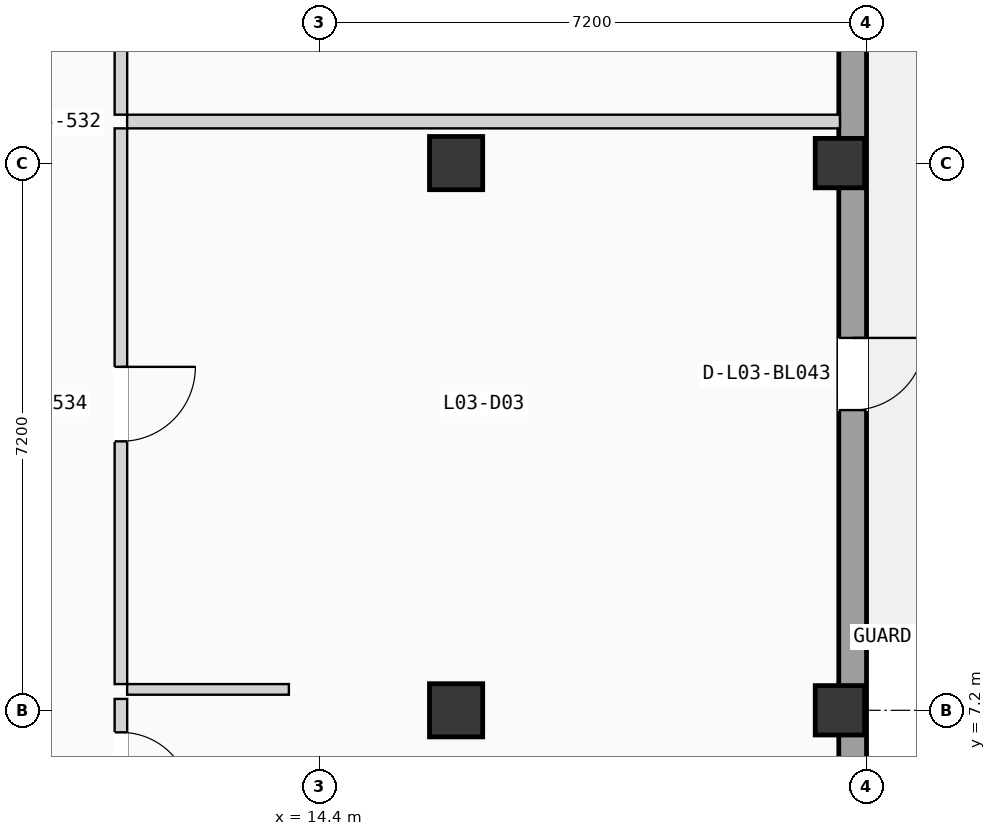
"""IFC4 building model, lengths in metres.
Left out: names, types, materials, properties, quantities, classifications, styles, units other than length and angle.
Written with IfcOpenShell. Run it as: python <this file> out.ifc"""

import sys

from ifc_helpers import new_model, si_unit, direction, frame, frame_2d, origin, origin_2d, place, context, subcontext, project, spatial, rectangle, extrude, element, fill, save


model = new_model("IFC4")
c1 = context("Model", 3, precision=1e-05, world=origin(), true_north=direction((0.0, 1.0)))
c2 = subcontext(c1, "Body", "Model", "MODEL_VIEW")
j1 = project(units=[si_unit("LENGTHUNIT", "METRE"), si_unit("PLANEANGLEUNIT", "RADIAN")], contexts=[c1])
p1 = place(None, origin())
s1 = spatial("IfcSite", under=j1, at=p1, CompositionType="ELEMENT")
p2 = place(p1, origin())
s2 = spatial("IfcBuilding", under=s1, at=p2, CompositionType="ELEMENT")
p3 = place(p2, frame((0.0, 0.0, 12.075)))
s3 = spatial("IfcBuildingStorey", under=s2, at=p3, CompositionType="ELEMENT", Elevation=12.075)
for number, where, z_axis, x_axis in (
    (1, (16.2, 7.2, 0.0), (0.0, 0.0, 1.0), (1.0, 0.0, 0.0)),
    (2, (16.2, 14.4, 0.0), (0.0, 0.0, 1.0), (1.0, 0.0, 0.0)),
):
    element("IfcColumn", number, at=place(p3, frame(where, z_axis=z_axis, x_axis=x_axis)), inside=s3, PredefinedType="COLUMN", context=c2, shape_type="SweptSolid", body=[
        extrude(rectangle(XDim=0.7, YDim=0.7, at=origin_2d()), origin(), (0.0, 0.0, 1.0), 3.15),
    ])
for number, where, z_axis, x_axis in (
    (3, (21.25, 7.2, 0.0), (0.0, 0.0, 1.0), (1.0, 0.0, 0.0)),
    (4, (21.25, 14.4, 0.0), (0.0, 0.0, 1.0), (1.0, 0.0, 0.0)),
):
    element("IfcColumn", number, at=place(p3, frame(where, z_axis=z_axis, x_axis=x_axis)), inside=s3, PredefinedType="COLUMN", context=c2, shape_type="SweptSolid", body=[
        extrude(rectangle(XDim=0.65, YDim=0.65, at=origin_2d()), origin(), (0.0, 0.0, 1.0), 3.15),
    ])
p4 = place(p3, frame((21.417, 0.365, 0.0), z_axis=(0.0, 0.0, 1.0), x_axis=(0.0, 1.0, 0.0)))
e5 = element("IfcWall", 5, at=p4, inside=s3, PredefinedType="SOLIDWALL", context=c2, shape_type="SweptSolid", body=[
    extrude(rectangle(XDim=49.67, YDim=0.365, at=frame_2d((24.835, 0.0))), origin(), (0.0, 0.0, 1.0), 2.89),
])
p5 = place(p4, frame((10.785, 0.0, 0.0)))
e6 = element("IfcOpeningElement", 6, at=p5, cuts=e5, PredefinedType="OPENING", context=c2, shape_type="SweptSolid", body=[
    extrude(rectangle(XDim=0.95, YDim=2.15, at=frame_2d((0.475, 1.075))), frame((0.0, 0.192, 0.0), z_axis=(0.0, -1.0, 0.0), x_axis=(1.0, 0.0, 0.0)), (0.0, 0.0, 1.0), 0.385),
])
p6 = place(p4, frame((16.893, 0.0, 0.855)))
e7 = element("IfcOpeningElement", 7, at=p6, cuts=e5, PredefinedType="OPENING", context=c2, shape_type="SweptSolid", body=[
    extrude(rectangle(XDim=1.85, YDim=1.35, at=frame_2d((0.925, 0.675))), frame((0.0, 0.192, 0.0), z_axis=(0.0, -1.0, 0.0), x_axis=(1.0, 0.0, 0.0)), (0.0, 0.0, 1.0), 0.385),
])
p7 = place(p4, frame((32.32, 0.0, 0.0)))
e8 = element("IfcOpeningElement", 8, at=p7, cuts=e5, PredefinedType="OPENING", context=c2, shape_type="SweptSolid", body=[
    extrude(rectangle(XDim=1.08, YDim=2.18, at=frame_2d((0.54, 1.09))), frame((0.0, 0.192, 0.0), z_axis=(0.0, -1.0, 0.0), x_axis=(1.0, 0.0, 0.0)), (0.0, 0.0, 1.0), 0.385),
])
p8 = place(p4, frame((24.212, 0.0, 0.705)))
e9 = element("IfcOpeningElement", 9, at=p8, cuts=e5, PredefinedType="OPENING", context=c2, shape_type="SweptSolid", body=[
    extrude(rectangle(XDim=1.85, YDim=1.5, at=frame_2d((0.925, 0.75))), frame((0.0, 0.192, 0.0), z_axis=(0.0, -1.0, 0.0), x_axis=(1.0, 0.0, 0.0)), (0.0, 0.0, 1.0), 0.385),
])
p9 = place(p4, frame((38.245, 0.0, 0.555)))
e10 = element("IfcOpeningElement", 10, at=p9, cuts=e5, PredefinedType="OPENING", context=c2, shape_type="SweptSolid", body=[
    extrude(rectangle(XDim=1.85, YDim=1.65, at=frame_2d((0.925, 0.825))), frame((0.0, 0.192, 0.0), z_axis=(0.0, -1.0, 0.0), x_axis=(1.0, 0.0, 0.0)), (0.0, 0.0, 1.0), 0.385),
])
p10 = place(p3, frame((11.79, 5.53, 0.0), z_axis=(0.0, 0.0, 1.0), x_axis=(0.0, 1.0, 0.0)))
e11 = element("IfcWall", 11, at=p10, inside=s3, PredefinedType="PARTITIONING", context=c2, shape_type="SweptSolid", body=[
    extrude(rectangle(XDim=1.82, YDim=0.165, at=frame_2d((0.91, 0.0))), origin(), (0.0, 0.0, 1.0), 2.87),
])
p11 = place(p10, frame((0.46, 0.0, 0.0)))
e12 = element("IfcOpeningElement", 12, at=p11, cuts=e11, PredefinedType="OPENING", context=c2, shape_type="SweptSolid", body=[
    extrude(rectangle(XDim=0.92, YDim=2.04, at=frame_2d((0.46, 1.02))), frame((0.0, 0.093, 0.0), z_axis=(0.0, -1.0, 0.0), x_axis=(1.0, 0.0, 0.0)), (0.0, 0.0, 1.0), 0.185),
])
p12 = place(p3, frame((11.872, 7.475, 0.0), z_axis=(0.0, 0.0, 1.0), x_axis=(1.0, 0.0, 0.0)))
e13 = element("IfcWall", 13, at=p12, inside=s3, PredefinedType="PARTITIONING", context=c2, shape_type="SweptSolid", body=[
    extrude(rectangle(XDim=2.128, YDim=0.14, at=frame_2d((1.064, 0.0))), origin(), (0.0, 0.0, 1.0), 2.87),
])
p13 = place(p3, frame((11.79, 7.545, 0.0), z_axis=(0.0, 0.0, 1.0), x_axis=(0.0, 1.0, 0.0)))
e14 = element("IfcWall", 14, at=p13, inside=s3, PredefinedType="PARTITIONING", context=c2, shape_type="SweptSolid", body=[
    extrude(rectangle(XDim=7.312, YDim=0.165, at=frame_2d((3.656, 0.0))), origin(), (0.0, 0.0, 1.0), 2.87),
])
p14 = place(p13, frame((3.194, 0.0, 0.0)))
e15 = element("IfcOpeningElement", 15, at=p14, cuts=e14, PredefinedType="OPENING", context=c2, shape_type="SweptSolid", body=[
    extrude(rectangle(XDim=0.98, YDim=2.08, at=frame_2d((0.49, 1.04))), frame((0.0, 0.093, 0.0), z_axis=(0.0, -1.0, 0.0), x_axis=(1.0, 0.0, 0.0)), (0.0, 0.0, 1.0), 0.185),
])
p15 = place(p3, frame((11.79, 15.037, 0.0), z_axis=(0.0, 0.0, 1.0), x_axis=(0.0, 1.0, 0.0)))
e16 = element("IfcWall", 16, at=p15, inside=s3, PredefinedType="PARTITIONING", context=c2, shape_type="SweptSolid", body=[
    extrude(rectangle(XDim=7.257, YDim=0.165, at=frame_2d((3.628, 0.0))), origin(), (0.0, 0.0, 1.0), 2.87),
])
p16 = place(p15, frame((3.139, 0.0, 0.0)))
e17 = element("IfcOpeningElement", 17, at=p16, cuts=e16, PredefinedType="OPENING", context=c2, shape_type="SweptSolid", body=[
    extrude(rectangle(XDim=0.98, YDim=2.08, at=frame_2d((0.49, 1.04))), frame((0.0, 0.093, 0.0), z_axis=(0.0, -1.0, 0.0), x_axis=(1.0, 0.0, 0.0)), (0.0, 0.0, 1.0), 0.185),
])
p17 = place(p3, frame((11.872, 14.947, 0.0), z_axis=(0.0, 0.0, 1.0), x_axis=(1.0, 0.0, 0.0)))
e18 = element("IfcWall", 18, at=p17, inside=s3, PredefinedType="PARTITIONING", context=c2, shape_type="SweptSolid", body=[
    extrude(rectangle(XDim=9.378, YDim=0.18, at=frame_2d((4.689, 0.0))), origin(), (0.0, 0.0, 1.0), 2.87),
])
p18 = place(p5, frame((0.95, 0.0, 0.0), z_axis=(0.0, 0.0, 1.0), x_axis=(-1.0, 0.0, 0.0)))
e19 = element("IfcDoor", 19, at=p18, inside=s3, OperationType="SINGLE_SWING_RIGHT", PredefinedType="DOOR", context=c2, shape_type="SweptSolid", body=[
    extrude(rectangle(XDim=0.95, YDim=2.15, at=frame_2d((0.475, 1.075))), frame((0.0, 0.025, 0.0), z_axis=(0.0, -1.0, 0.0), x_axis=(1.0, 0.0, 0.0)), (0.0, 0.0, 1.0), 0.05),
])
fill(e6, e19)
p19 = place(p11, frame((0.92, 0.0, 0.0), z_axis=(0.0, 0.0, 1.0), x_axis=(-1.0, 0.0, 0.0)))
e20 = element("IfcDoor", 20, at=p19, inside=s3, OperationType="SINGLE_SWING_LEFT", PredefinedType="DOOR", context=c2, shape_type="SweptSolid", body=[
    extrude(rectangle(XDim=0.92, YDim=2.04, at=frame_2d((0.46, 1.02))), frame((0.0, 0.025, 0.0), z_axis=(0.0, -1.0, 0.0), x_axis=(1.0, 0.0, 0.0)), (0.0, 0.0, 1.0), 0.05),
])
fill(e12, e20)
p20 = place(p14, frame((0.98, 0.0, 0.0), z_axis=(0.0, 0.0, 1.0), x_axis=(-1.0, 0.0, 0.0)))
e21 = element("IfcDoor", 21, at=p20, inside=s3, OperationType="SINGLE_SWING_RIGHT", PredefinedType="DOOR", context=c2, shape_type="SweptSolid", body=[
    extrude(rectangle(XDim=0.98, YDim=2.08, at=frame_2d((0.49, 1.04))), frame((0.0, 0.025, 0.0), z_axis=(0.0, -1.0, 0.0), x_axis=(1.0, 0.0, 0.0)), (0.0, 0.0, 1.0), 0.05),
])
fill(e15, e21)
save(model, sys.argv[1])
